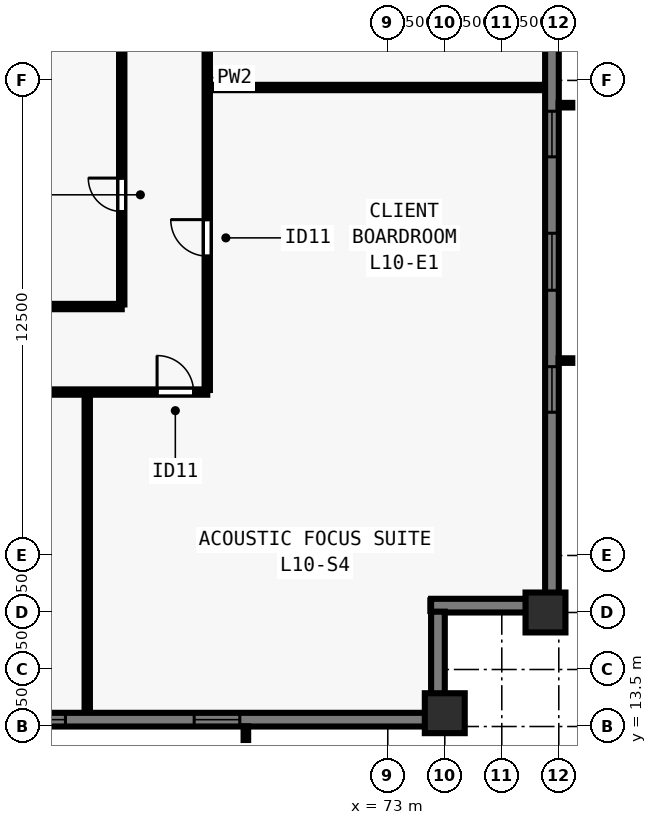
"""IFC4 building model, lengths in metres.
Left out: names, types, materials, properties, quantities, classifications, styles, units other than length and angle.
Written with IfcOpenShell. Run it as: python <this file> out.ifc"""

import sys

from ifc_helpers import new_model, si_unit, direction, frame, frame_2d, origin, origin_2d, place, context, subcontext, project, spatial, rectangle, extrude, element, fill, save


model = new_model("IFC4")
c1 = context("Model", 3, precision=1e-05, world=origin(), true_north=direction((0.0, 1.0)))
c2 = subcontext(c1, "Body", "Model", "MODEL_VIEW")
j1 = project(units=[si_unit("LENGTHUNIT", "METRE"), si_unit("PLANEANGLEUNIT", "RADIAN")], contexts=[c1])
p1 = place(None, origin())
s1 = spatial("IfcSite", under=j1, at=p1, CompositionType="ELEMENT")
p2 = place(p1, origin())
s2 = spatial("IfcBuilding", under=s1, at=p2, CompositionType="ELEMENT")
p3 = place(p2, frame((0.0, 0.0, 41.0)))
s3 = spatial("IfcBuildingStorey", under=s2, at=p3, CompositionType="ELEMENT", Elevation=41.0)
for number, where, z_axis, x_axis in (
    (1, (74.5, 13.85, 0.0), (0.0, 0.0, 1.0), (1.0, 0.0, 0.0)),
    (2, (77.15, 16.5, 0.0), (0.0, 0.0, 1.0), (0.0, 1.0, 0.0)),
):
    element("IfcColumn", number, at=place(p3, frame(where, z_axis=z_axis, x_axis=x_axis)), inside=s3, PredefinedType="COLUMN", context=c2, shape_type="SweptSolid", body=[
        extrude(rectangle(XDim=1.05, YDim=1.05, at=origin_2d()), origin(), (0.0, 0.0, 1.0), 3.5),
    ])
p4 = place(p3, frame((77.32, 61.5, 0.0), z_axis=(0.0, 0.0, 1.0), x_axis=(0.0, -1.0, 0.0)))
e3 = element("IfcWall", 3, at=p4, inside=s3, PredefinedType="SOLIDWALL", context=c2, shape_type="SweptSolid", body=[
    extrude(rectangle(XDim=44.662, YDim=0.36, at=frame_2d((22.331, 0.0))), origin(), (0.0, 0.0, 1.0), 3.28),
])
p5 = place(p4, frame((4.93, 0.0, 0.8)))
e4 = element("IfcOpeningElement", 4, at=p5, cuts=e3, PredefinedType="OPENING", context=c2, shape_type="SweptSolid", body=[
    extrude(rectangle(XDim=1.2, YDim=1.544, at=frame_2d((0.6, 0.772))), frame((0.0, 0.19, 0.0), z_axis=(0.0, -1.0, 0.0), x_axis=(1.0, 0.0, 0.0)), (0.0, 0.0, 1.0), 0.38),
])
p6 = place(p4, frame((8.14, 0.0, 0.8)))
e5 = element("IfcOpeningElement", 5, at=p6, cuts=e3, PredefinedType="OPENING", context=c2, shape_type="SweptSolid", body=[
    extrude(rectangle(XDim=1.5, YDim=1.544, at=frame_2d((0.75, 0.772))), frame((0.0, 0.19, 0.0), z_axis=(0.0, -1.0, 0.0), x_axis=(1.0, 0.0, 0.0)), (0.0, 0.0, 1.0), 0.38),
])
p7 = place(p4, frame((11.65, 0.0, 0.8)))
e6 = element("IfcOpeningElement", 6, at=p7, cuts=e3, PredefinedType="OPENING", context=c2, shape_type="SweptSolid", body=[
    extrude(rectangle(XDim=1.2, YDim=1.544, at=frame_2d((0.6, 0.772))), frame((0.0, 0.19, 0.0), z_axis=(0.0, -1.0, 0.0), x_axis=(1.0, 0.0, 0.0)), (0.0, 0.0, 1.0), 0.38),
])
p8 = place(p4, frame((15.311, 0.0, 0.8)))
e7 = element("IfcOpeningElement", 7, at=p8, cuts=e3, PredefinedType="OPENING", context=c2, shape_type="SweptSolid", body=[
    extrude(rectangle(XDim=1.5, YDim=1.544, at=frame_2d((0.75, 0.772))), frame((0.0, 0.19, 0.0), z_axis=(0.0, -1.0, 0.0), x_axis=(1.0, 0.0, 0.0)), (0.0, 0.0, 1.0), 0.38),
])
p9 = place(p4, frame((18.821, 0.0, 0.8)))
e8 = element("IfcOpeningElement", 8, at=p9, cuts=e3, PredefinedType="OPENING", context=c2, shape_type="SweptSolid", body=[
    extrude(rectangle(XDim=1.2, YDim=1.544, at=frame_2d((0.6, 0.772))), frame((0.0, 0.19, 0.0), z_axis=(0.0, -1.0, 0.0), x_axis=(1.0, 0.0, 0.0)), (0.0, 0.0, 1.0), 0.38),
])
p10 = place(p4, frame((20.331, 0.0, 0.8)))
e9 = element("IfcOpeningElement", 9, at=p10, cuts=e3, PredefinedType="OPENING", context=c2, shape_type="SweptSolid", body=[
    extrude(rectangle(XDim=1.5, YDim=1.544, at=frame_2d((0.75, 0.772))), frame((0.0, 0.19, 0.0), z_axis=(0.0, -1.0, 0.0), x_axis=(1.0, 0.0, 0.0)), (0.0, 0.0, 1.0), 0.38),
])
p11 = place(p4, frame((25.091, 0.0, 0.8)))
e10 = element("IfcOpeningElement", 10, at=p11, cuts=e3, PredefinedType="OPENING", context=c2, shape_type="SweptSolid", body=[
    extrude(rectangle(XDim=1.2, YDim=1.544, at=frame_2d((0.6, 0.772))), frame((0.0, 0.19, 0.0), z_axis=(0.0, -1.0, 0.0), x_axis=(1.0, 0.0, 0.0)), (0.0, 0.0, 1.0), 0.38),
])
p12 = place(p4, frame((28.302, 0.0, 0.8)))
e11 = element("IfcOpeningElement", 11, at=p12, cuts=e3, PredefinedType="OPENING", context=c2, shape_type="SweptSolid", body=[
    extrude(rectangle(XDim=1.5, YDim=1.544, at=frame_2d((0.75, 0.772))), frame((0.0, 0.19, 0.0), z_axis=(0.0, -1.0, 0.0), x_axis=(1.0, 0.0, 0.0)), (0.0, 0.0, 1.0), 0.38),
])
p13 = place(p4, frame((31.812, 0.0, 0.8)))
e12 = element("IfcOpeningElement", 12, at=p13, cuts=e3, PredefinedType="OPENING", context=c2, shape_type="SweptSolid", body=[
    extrude(rectangle(XDim=1.2, YDim=1.544, at=frame_2d((0.6, 0.772))), frame((0.0, 0.19, 0.0), z_axis=(0.0, -1.0, 0.0), x_axis=(1.0, 0.0, 0.0)), (0.0, 0.0, 1.0), 0.38),
])
p14 = place(p4, frame((35.022, 0.0, 0.8)))
e13 = element("IfcOpeningElement", 13, at=p14, cuts=e3, PredefinedType="OPENING", context=c2, shape_type="SweptSolid", body=[
    extrude(rectangle(XDim=1.5, YDim=1.544, at=frame_2d((0.75, 0.772))), frame((0.0, 0.19, 0.0), z_axis=(0.0, -1.0, 0.0), x_axis=(1.0, 0.0, 0.0)), (0.0, 0.0, 1.0), 0.38),
])
p15 = place(p4, frame((38.532, 0.0, 0.8)))
e14 = element("IfcOpeningElement", 14, at=p15, cuts=e3, PredefinedType="OPENING", context=c2, shape_type="SweptSolid", body=[
    extrude(rectangle(XDim=1.2, YDim=1.544, at=frame_2d((0.6, 0.772))), frame((0.0, 0.19, 0.0), z_axis=(0.0, -1.0, 0.0), x_axis=(1.0, 0.0, 0.0)), (0.0, 0.0, 1.0), 0.38),
])
p16 = place(p3, frame((77.5, 16.68, 0.0), z_axis=(0.0, 0.0, 1.0), x_axis=(-1.0, 0.0, 0.0)))
e15 = element("IfcWall", 15, at=p16, inside=s3, PredefinedType="SOLIDWALL", context=c2, shape_type="SweptSolid", body=[
    extrude(rectangle(XDim=3.36, YDim=0.36, at=frame_2d((1.68, 0.0))), origin(), (0.0, 0.0, 1.0), 3.28),
])
p17 = place(p3, frame((74.32, 16.522, 0.0), z_axis=(0.0, 0.0, 1.0), x_axis=(0.0, -1.0, 0.0)))
e16 = element("IfcWall", 16, at=p17, inside=s3, PredefinedType="SOLIDWALL", context=c2, shape_type="SweptSolid", body=[
    extrude(rectangle(XDim=2.684, YDim=0.36, at=frame_2d((1.342, 0.0))), origin(), (0.0, 0.0, 1.0), 3.28),
])
p18 = place(p3, frame((74.5, 13.68, 0.0), z_axis=(0.0, 0.0, 1.0), x_axis=(-1.0, 0.0, 0.0)))
e17 = element("IfcWall", 17, at=p18, inside=s3, PredefinedType="SOLIDWALL", context=c2, shape_type="SweptSolid", body=[
    extrude(rectangle(XDim=17.962, YDim=0.36, at=frame_2d((8.981, 0.0))), origin(), (0.0, 0.0, 1.0), 3.28),
])
p19 = place(p18, frame((5.394, 0.0, 0.8)))
e18 = element("IfcOpeningElement", 18, at=p19, cuts=e17, PredefinedType="OPENING", context=c2, shape_type="SweptSolid", body=[
    extrude(rectangle(XDim=1.2, YDim=1.544, at=frame_2d((0.6, 0.772))), frame((0.0, 0.19, 0.0), z_axis=(0.0, -1.0, 0.0), x_axis=(1.0, 0.0, 0.0)), (0.0, 0.0, 1.0), 0.38),
])
p20 = place(p18, frame((9.981, 0.0, 0.8)))
e19 = element("IfcOpeningElement", 19, at=p20, cuts=e17, PredefinedType="OPENING", context=c2, shape_type="SweptSolid", body=[
    extrude(rectangle(XDim=1.5, YDim=1.544, at=frame_2d((0.75, 0.772))), frame((0.0, 0.19, 0.0), z_axis=(0.0, -1.0, 0.0), x_axis=(1.0, 0.0, 0.0)), (0.0, 0.0, 1.0), 0.38),
])
p21 = place(p18, frame((13.968, 0.0, 0.8)))
e20 = element("IfcOpeningElement", 20, at=p21, cuts=e17, PredefinedType="OPENING", context=c2, shape_type="SweptSolid", body=[
    extrude(rectangle(XDim=1.2, YDim=1.544, at=frame_2d((0.6, 0.772))), frame((0.0, 0.19, 0.0), z_axis=(0.0, -1.0, 0.0), x_axis=(1.0, 0.0, 0.0)), (0.0, 0.0, 1.0), 0.38),
])
p22 = place(p3, frame((35.75, 22.3, 0.0), z_axis=(0.0, 0.0, 1.0), x_axis=(1.0, 0.0, 0.0)))
e21 = element("IfcWall", 21, at=p22, inside=s3, PredefinedType="PARTITIONING", context=c2, shape_type="SweptSolid", body=[
    extrude(rectangle(XDim=32.5, YDim=0.14, at=frame_2d((16.25, 0.0))), origin(), (0.0, 0.0, 1.0), 3.28),
])
p23 = place(p22, frame((1.604, 0.0, 0.0)))
e22 = element("IfcOpeningElement", 22, at=p23, cuts=e21, PredefinedType="OPENING", context=c2, shape_type="SweptSolid", body=[
    extrude(rectangle(XDim=0.96, YDim=2.12, at=frame_2d((0.48, 1.06))), frame((0.0, 0.08, 0.0), z_axis=(0.0, -1.0, 0.0), x_axis=(1.0, 0.0, 0.0)), (0.0, 0.0, 1.0), 0.16),
])
p24 = place(p22, frame((9.585, 0.0, 0.0)))
e23 = element("IfcOpeningElement", 23, at=p24, cuts=e21, PredefinedType="OPENING", context=c2, shape_type="SweptSolid", body=[
    extrude(rectangle(XDim=0.96, YDim=2.12, at=frame_2d((0.48, 1.06))), frame((0.0, 0.08, 0.0), z_axis=(0.0, -1.0, 0.0), x_axis=(1.0, 0.0, 0.0)), (0.0, 0.0, 1.0), 0.16),
])
p25 = place(p22, frame((22.125, 0.0, 0.0)))
e24 = element("IfcOpeningElement", 24, at=p25, cuts=e21, PredefinedType="OPENING", context=c2, shape_type="SweptSolid", body=[
    extrude(rectangle(XDim=0.96, YDim=2.12, at=frame_2d((0.48, 1.06))), frame((0.0, 0.08, 0.0), z_axis=(0.0, -1.0, 0.0), x_axis=(1.0, 0.0, 0.0)), (0.0, 0.0, 1.0), 0.16),
])
p26 = place(p22, frame((31.18, 0.0, 0.0)))
e25 = element("IfcOpeningElement", 25, at=p26, cuts=e21, PredefinedType="OPENING", context=c2, shape_type="SweptSolid", body=[
    extrude(rectangle(XDim=0.96, YDim=2.12, at=frame_2d((0.48, 1.06))), frame((0.0, 0.08, 0.0), z_axis=(0.0, -1.0, 0.0), x_axis=(1.0, 0.0, 0.0)), (0.0, 0.0, 1.0), 0.16),
])
p27 = place(p3, frame((68.25, 22.355, 0.0), z_axis=(0.0, 0.0, 1.0), x_axis=(0.0, 1.0, 0.0)))
e26 = element("IfcWall", 26, at=p27, inside=s3, PredefinedType="PARTITIONING", context=c2, shape_type="SweptSolid", body=[
    extrude(rectangle(XDim=33.29, YDim=0.14, at=frame_2d((16.645, 0.0))), origin(), (0.0, 0.0, 1.0), 3.28),
])
p28 = place(p27, frame((3.522, 0.0, 0.0)))
e27 = element("IfcOpeningElement", 27, at=p28, cuts=e26, PredefinedType="OPENING", context=c2, shape_type="SweptSolid", body=[
    extrude(rectangle(XDim=0.96, YDim=2.12, at=frame_2d((0.48, 1.06))), frame((0.0, 0.08, 0.0), z_axis=(0.0, -1.0, 0.0), x_axis=(1.0, 0.0, 0.0)), (0.0, 0.0, 1.0), 0.16),
])
p29 = place(p27, frame((11.956, 0.0, 0.0)))
e28 = element("IfcOpeningElement", 28, at=p29, cuts=e26, PredefinedType="OPENING", context=c2, shape_type="SweptSolid", body=[
    extrude(rectangle(XDim=0.96, YDim=2.12, at=frame_2d((0.48, 1.06))), frame((0.0, 0.08, 0.0), z_axis=(0.0, -1.0, 0.0), x_axis=(1.0, 0.0, 0.0)), (0.0, 0.0, 1.0), 0.16),
])
p30 = place(p27, frame((20.256, 0.0, 0.0)))
e29 = element("IfcOpeningElement", 29, at=p30, cuts=e26, PredefinedType="OPENING", context=c2, shape_type="SweptSolid", body=[
    extrude(rectangle(XDim=0.96, YDim=2.12, at=frame_2d((0.48, 1.06))), frame((0.0, 0.08, 0.0), z_axis=(0.0, -1.0, 0.0), x_axis=(1.0, 0.0, 0.0)), (0.0, 0.0, 1.0), 0.16),
])
p31 = place(p27, frame((28.422, 0.0, 0.0)))
e30 = element("IfcOpeningElement", 30, at=p31, cuts=e26, PredefinedType="OPENING", context=c2, shape_type="SweptSolid", body=[
    extrude(rectangle(XDim=0.96, YDim=2.12, at=frame_2d((0.48, 1.06))), frame((0.0, 0.08, 0.0), z_axis=(0.0, -1.0, 0.0), x_axis=(1.0, 0.0, 0.0)), (0.0, 0.0, 1.0), 0.16),
])
p32 = place(p3, frame((38.0, 24.55, 0.0), z_axis=(0.0, 0.0, 1.0), x_axis=(1.0, 0.0, 0.0)))
e31 = element("IfcWall", 31, at=p32, inside=s3, PredefinedType="PARTITIONING", context=c2, shape_type="SweptSolid", body=[
    extrude(rectangle(XDim=28.0, YDim=0.14, at=frame_2d((14.0, 0.0))), origin(), (0.0, 0.0, 1.0), 3.28),
])
p33 = place(p32, frame((1.2, 0.0, 0.0)))
e32 = element("IfcOpeningElement", 32, at=p33, cuts=e31, PredefinedType="OPENING", context=c2, shape_type="SweptSolid", body=[
    extrude(rectangle(XDim=0.88, YDim=2.1, at=frame_2d((0.44, 1.05))), frame((0.0, 0.08, 0.0), z_axis=(0.0, -1.0, 0.0), x_axis=(1.0, 0.0, 0.0)), (0.0, 0.0, 1.0), 0.16),
])
p34 = place(p32, frame((10.5, 0.0, 0.0)))
e33 = element("IfcOpeningElement", 33, at=p34, cuts=e31, PredefinedType="OPENING", context=c2, shape_type="SweptSolid", body=[
    extrude(rectangle(XDim=0.88, YDim=2.1, at=frame_2d((0.44, 1.05))), frame((0.0, 0.08, 0.0), z_axis=(0.0, -1.0, 0.0), x_axis=(1.0, 0.0, 0.0)), (0.0, 0.0, 1.0), 0.16),
])
p35 = place(p32, frame((21.0, 0.0, 0.0)))
e34 = element("IfcOpeningElement", 34, at=p35, cuts=e31, PredefinedType="OPENING", context=c2, shape_type="SweptSolid", body=[
    extrude(rectangle(XDim=0.88, YDim=2.1, at=frame_2d((0.44, 1.05))), frame((0.0, 0.08, 0.0), z_axis=(0.0, -1.0, 0.0), x_axis=(1.0, 0.0, 0.0)), (0.0, 0.0, 1.0), 0.16),
])
p36 = place(p3, frame((66.0, 24.605, 0.0), z_axis=(0.0, 0.0, 1.0), x_axis=(0.0, 1.0, 0.0)))
e35 = element("IfcWall", 35, at=p36, inside=s3, PredefinedType="PARTITIONING", context=c2, shape_type="SweptSolid", body=[
    extrude(rectangle(XDim=14.145, YDim=0.14, at=frame_2d((7.073, 0.0))), origin(), (0.0, 0.0, 1.0), 3.28),
])
p37 = place(p36, frame((2.445, 0.0, 0.0)))
e36 = element("IfcOpeningElement", 36, at=p37, cuts=e35, PredefinedType="OPENING", context=c2, shape_type="SweptSolid", body=[
    extrude(rectangle(XDim=0.88, YDim=2.1, at=frame_2d((0.44, 1.05))), frame((0.0, 0.08, 0.0), z_axis=(0.0, -1.0, 0.0), x_axis=(1.0, 0.0, 0.0)), (0.0, 0.0, 1.0), 0.16),
])
p38 = place(p3, frame((65.093, 13.92, 0.0), z_axis=(0.0, 0.0, 1.0), x_axis=(0.0, 1.0, 0.0)))
e37 = element("IfcWall", 37, at=p38, inside=s3, PredefinedType="PARTITIONING", context=c2, shape_type="SweptSolid", body=[
    extrude(rectangle(XDim=8.28, YDim=0.14, at=frame_2d((4.14, 0.0))), origin(), (0.0, 0.0, 1.0), 3.28),
])
p39 = place(p3, frame((68.35, 30.313, 0.0), z_axis=(0.0, 0.0, 1.0), x_axis=(1.0, 0.0, 0.0)))
e38 = element("IfcWall", 38, at=p39, inside=s3, PredefinedType="PARTITIONING", context=c2, shape_type="SweptSolid", body=[
    extrude(rectangle(XDim=8.73, YDim=0.14, at=frame_2d((4.365, 0.0))), origin(), (0.0, 0.0, 1.0), 3.28),
])
p40 = place(p13, origin())
e39 = element("IfcWindow", 39, at=p40, inside=s3, PartitioningType="SINGLE_PANEL", PredefinedType="WINDOW", context=c2, shape_type="SweptSolid", body=[
    extrude(rectangle(XDim=1.2, YDim=1.544, at=frame_2d((0.6, 0.772))), frame((0.0, -0.05, 0.0), z_axis=(0.0, -1.0, 0.0), x_axis=(1.0, 0.0, 0.0)), (0.0, 0.0, 1.0), 0.06),
])
fill(e12, e39)
p41 = place(p14, origin())
e40 = element("IfcWindow", 40, at=p41, inside=s3, PartitioningType="SINGLE_PANEL", PredefinedType="WINDOW", context=c2, shape_type="SweptSolid", body=[
    extrude(rectangle(XDim=1.5, YDim=1.544, at=frame_2d((0.75, 0.772))), frame((0.0, -0.05, 0.0), z_axis=(0.0, -1.0, 0.0), x_axis=(1.0, 0.0, 0.0)), (0.0, 0.0, 1.0), 0.06),
])
fill(e13, e40)
p42 = place(p15, origin())
e41 = element("IfcWindow", 41, at=p42, inside=s3, PartitioningType="SINGLE_PANEL", PredefinedType="WINDOW", context=c2, shape_type="SweptSolid", body=[
    extrude(rectangle(XDim=1.2, YDim=1.544, at=frame_2d((0.6, 0.772))), frame((0.0, -0.05, 0.0), z_axis=(0.0, -1.0, 0.0), x_axis=(1.0, 0.0, 0.0)), (0.0, 0.0, 1.0), 0.06),
])
fill(e14, e41)
p43 = place(p19, origin())
e42 = element("IfcWindow", 42, at=p43, inside=s3, PartitioningType="SINGLE_PANEL", PredefinedType="WINDOW", context=c2, shape_type="SweptSolid", body=[
    extrude(rectangle(XDim=1.2, YDim=1.544, at=frame_2d((0.6, 0.772))), frame((0.0, -0.05, 0.0), z_axis=(0.0, -1.0, 0.0), x_axis=(1.0, 0.0, 0.0)), (0.0, 0.0, 1.0), 0.06),
])
fill(e18, e42)
p44 = place(p20, origin())
e43 = element("IfcWindow", 43, at=p44, inside=s3, PartitioningType="SINGLE_PANEL", PredefinedType="WINDOW", context=c2, shape_type="SweptSolid", body=[
    extrude(rectangle(XDim=1.5, YDim=1.544, at=frame_2d((0.75, 0.772))), frame((0.0, -0.05, 0.0), z_axis=(0.0, -1.0, 0.0), x_axis=(1.0, 0.0, 0.0)), (0.0, 0.0, 1.0), 0.06),
])
fill(e19, e43)
p45 = place(p37, origin())
e44 = element("IfcDoor", 44, at=p45, inside=s3, OperationType="SINGLE_SWING_RIGHT", PredefinedType="DOOR", context=c2, shape_type="SweptSolid", body=[
    extrude(rectangle(XDim=0.88, YDim=2.1, at=frame_2d((0.44, 1.05))), frame((0.0, 0.025, 0.0), z_axis=(0.0, -1.0, 0.0), x_axis=(1.0, 0.0, 0.0)), (0.0, 0.0, 1.0), 0.05),
])
fill(e36, e44)
p46 = place(p26, origin())
e45 = element("IfcDoor", 45, at=p46, inside=s3, OperationType="SINGLE_SWING_LEFT", PredefinedType="DOOR", context=c2, shape_type="SweptSolid", body=[
    extrude(rectangle(XDim=0.96, YDim=2.12, at=frame_2d((0.48, 1.06))), frame((0.0, 0.025, 0.0), z_axis=(0.0, -1.0, 0.0), x_axis=(1.0, 0.0, 0.0)), (0.0, 0.0, 1.0), 0.05),
])
fill(e25, e45)
p47 = place(p28, origin())
e46 = element("IfcDoor", 46, at=p47, inside=s3, OperationType="SINGLE_SWING_RIGHT", PredefinedType="DOOR", context=c2, shape_type="SweptSolid", body=[
    extrude(rectangle(XDim=0.96, YDim=2.12, at=frame_2d((0.48, 1.06))), frame((0.0, 0.025, 0.0), z_axis=(0.0, -1.0, 0.0), x_axis=(1.0, 0.0, 0.0)), (0.0, 0.0, 1.0), 0.05),
])
fill(e27, e46)
save(model, sys.argv[1])
